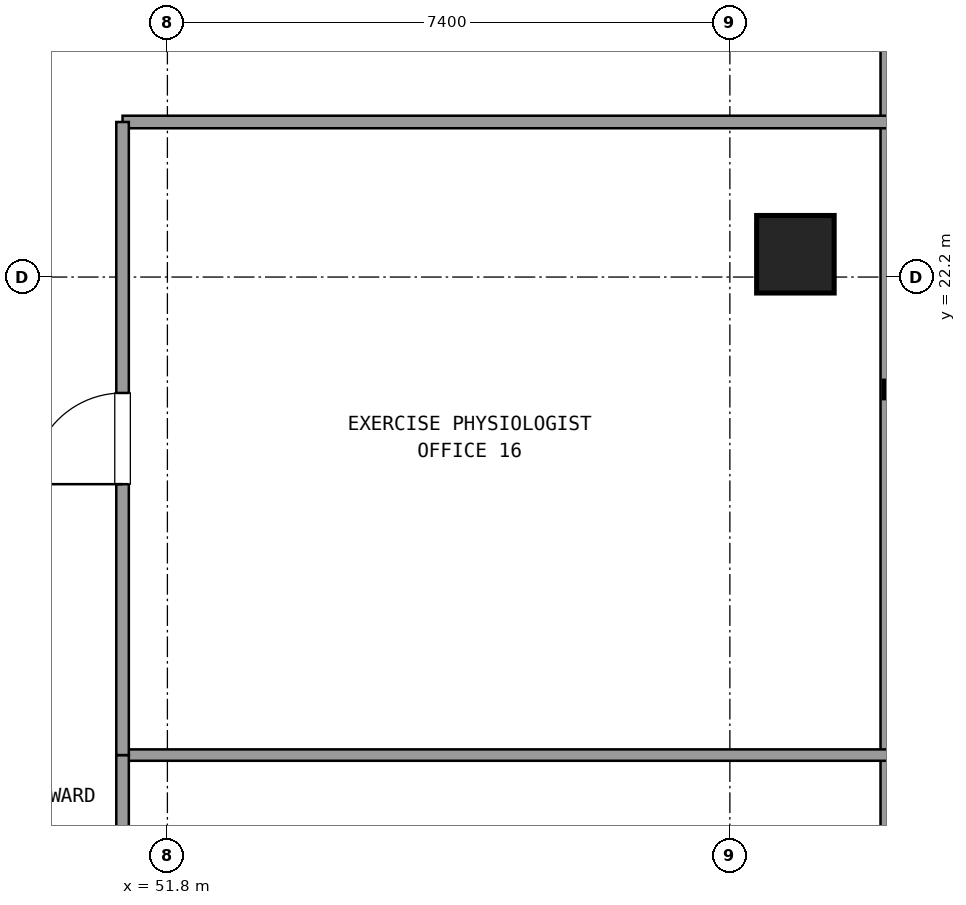
"""IFC4 building model, lengths in metres.
Left out: names, types, materials, properties, quantities, classifications, styles, units other than length and angle.
Written with IfcOpenShell. Run it as: python <this file> out.ifc"""

import sys

from ifc_helpers import new_model, si_unit, direction, frame, frame_2d, origin, origin_2d, place, context, subcontext, project, spatial, rectangle, extrude, element, fill, save


model = new_model("IFC4")
c1 = context("Model", 3, precision=1e-05, world=origin(), true_north=direction((0.0, 1.0)))
c2 = subcontext(c1, "Body", "Model", "MODEL_VIEW")
j1 = project(units=[si_unit("LENGTHUNIT", "METRE"), si_unit("PLANEANGLEUNIT", "RADIAN")], contexts=[c1])
p1 = place(None, origin())
s1 = spatial("IfcSite", under=j1, at=p1, CompositionType="ELEMENT")
p2 = place(p1, origin())
s2 = spatial("IfcBuilding", under=s1, at=p2, CompositionType="ELEMENT")
p3 = place(p2, frame((0.0, 0.0, 117.18)))
s3 = spatial("IfcBuildingStorey", under=s2, at=p3, CompositionType="ELEMENT", Elevation=117.18)
p4 = place(p3, frame((60.062, 22.5, 0.021), z_axis=(-0.084573087246, 0.0, 0.99641727851), x_axis=(0.0, -1.0, 0.0)))
e1 = element("IfcColumn", 1, at=p4, inside=s3, PredefinedType="COLUMN", context=c2, shape_type="SweptSolid", body=[
    extrude(rectangle(XDim=1.02, YDim=1.02, at=origin_2d()), origin(), (0.0, 0.0, 1.0), 3.571),
])
p5 = place(p3, frame((61.302, 10.363, 0.0), z_axis=(0.0, 0.0, 1.0), x_axis=(0.0, 1.0, 0.0)))
e2 = element("IfcWall", 2, at=p5, inside=s3, PredefinedType="SOLIDWALL", context=c2, shape_type="SweptSolid", body=[
    extrude(rectangle(XDim=31.074, YDim=0.24, at=frame_2d((15.537, 0.0))), origin(), (0.0, 0.0, 1.0), 0.85),
])
p6 = place(p3, frame((51.21, 24.24, 0.0), z_axis=(0.0, 0.0, 1.0), x_axis=(1.0, 0.0, 0.0)))
e3 = element("IfcWall", 3, at=p6, inside=s3, PredefinedType="PARTITIONING", context=c2, shape_type="SweptSolid", body=[
    extrude(rectangle(XDim=10.072, YDim=0.165, at=frame_2d((5.036, 0.0))), origin(), (0.0, 0.0, 1.0), 2.61),
])
p7 = place(p3, frame((51.21, 15.911, 0.0), z_axis=(0.0, 0.0, 1.0), x_axis=(1.0, 0.0, 0.0)))
e4 = element("IfcWall", 4, at=p7, inside=s3, PredefinedType="PARTITIONING", context=c2, shape_type="SweptSolid", body=[
    extrude(rectangle(XDim=10.072, YDim=0.15, at=frame_2d((5.036, 0.0))), origin(), (0.0, 0.0, 1.0), 2.61),
])
p8 = place(p3, frame((51.21, 4.408, 0.0), z_axis=(0.0, 0.0, 1.0), x_axis=(0.0, 1.0, 0.0)))
e5 = element("IfcWall", 5, at=p8, inside=s3, PredefinedType="PARTITIONING", context=c2, shape_type="SweptSolid", body=[
    extrude(rectangle(XDim=11.503, YDim=0.165, at=frame_2d((5.751, 0.0))), origin(), (0.0, 0.0, 1.0), 2.61),
])
p9 = place(p8, frame((5.152, 0.0, 0.0)))
e6 = element("IfcOpeningElement", 6, at=p9, cuts=e5, PredefinedType="OPENING", context=c2, shape_type="SweptSolid", body=[
    extrude(rectangle(XDim=1.2, YDim=2.15, at=frame_2d((0.6, 1.075))), frame((0.0, 0.093, 0.0), z_axis=(0.0, -1.0, 0.0), x_axis=(1.0, 0.0, 0.0)), (0.0, 0.0, 1.0), 0.185),
])
p10 = place(p3, frame((51.21, 15.911, 0.0), z_axis=(0.0, 0.0, 1.0), x_axis=(0.0, 1.0, 0.0)))
e7 = element("IfcWall", 7, at=p10, inside=s3, PredefinedType="PARTITIONING", context=c2, shape_type="SweptSolid", body=[
    extrude(rectangle(XDim=8.329, YDim=0.165, at=frame_2d((4.165, 0.0))), origin(), (0.0, 0.0, 1.0), 2.61),
])
p11 = place(p10, frame((3.564, 0.0, 0.0)))
e8 = element("IfcOpeningElement", 8, at=p11, cuts=e7, PredefinedType="OPENING", context=c2, shape_type="SweptSolid", body=[
    extrude(rectangle(XDim=1.2, YDim=2.15, at=frame_2d((0.6, 1.075))), frame((0.0, 0.093, 0.0), z_axis=(0.0, -1.0, 0.0), x_axis=(1.0, 0.0, 0.0)), (0.0, 0.0, 1.0), 0.185),
])
p12 = place(p11, origin())
e9 = element("IfcDoor", 9, at=p12, inside=s3, OperationType="SINGLE_SWING_LEFT", PredefinedType="DOOR", context=c2, shape_type="SweptSolid", body=[
    extrude(rectangle(XDim=1.2, YDim=2.15, at=frame_2d((0.6, 1.075))), frame((0.0, 0.025, 0.0), z_axis=(0.0, -1.0, 0.0), x_axis=(1.0, 0.0, 0.0)), (0.0, 0.0, 1.0), 0.05),
])
fill(e8, e9)
save(model, sys.argv[1])
